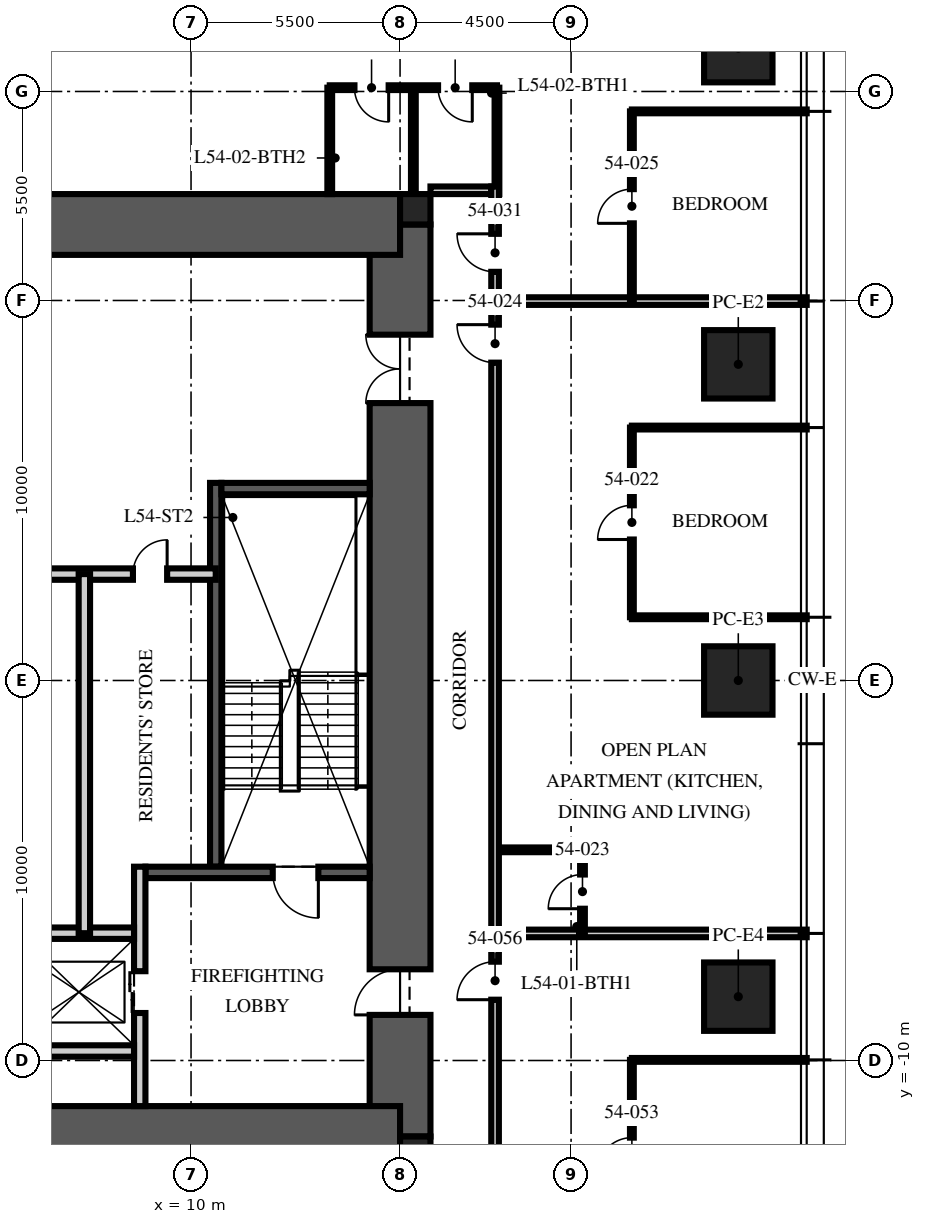
"""IFC4 building model, lengths in metres.
Left out: names, types, materials, properties, quantities, classifications, styles, units other than length and angle.
Written with IfcOpenShell. Run it as: python <this file> out.ifc"""

import sys

from ifc_helpers import new_model, si_unit, direction, frame, frame_2d, origin, origin_2d, place, context, subcontext, project, spatial, rectangle, extrude, element, fill, save


model = new_model("IFC4")
c1 = context("Model", 3, precision=1e-05, world=origin(), true_north=direction((0.0, 1.0)))
c2 = subcontext(c1, "Body", "Model", "MODEL_VIEW")
j1 = project(units=[si_unit("LENGTHUNIT", "METRE"), si_unit("PLANEANGLEUNIT", "RADIAN")], contexts=[c1])
p1 = place(None, origin())
s1 = spatial("IfcSite", under=j1, at=p1, CompositionType="ELEMENT")
p2 = place(p1, origin())
s2 = spatial("IfcBuilding", under=s1, at=p2, CompositionType="ELEMENT")
p3 = place(p2, frame((0.0, 0.0, 218.25)))
s3 = spatial("IfcBuildingStorey", under=s2, at=p3, CompositionType="ELEMENT", Elevation=218.25)
p4 = place(p3, frame((15.5, -12.0, -0.25), z_axis=(0.0, 0.0, 1.0), x_axis=(0.0, 1.0, 0.0)))
e1 = element("IfcWall", 1, at=p4, inside=s3, PredefinedType="SHEAR", context=c2, shape_type="SweptSolid", body=[
    extrude(rectangle(XDim=24.0, YDim=1.6, at=frame_2d((12.0, 0.0))), origin(), (0.0, 0.0, 1.0), 3.75),
])
p5 = place(p4, frame((3.2, 0.0, 0.25)))
e2 = element("IfcOpeningElement", 2, at=p5, cuts=e1, PredefinedType="OPENING", context=c2, shape_type="SweptSolid", body=[
    extrude(rectangle(XDim=1.2, YDim=2.1, at=frame_2d((0.6, 1.05))), frame((0.0, 0.81, 0.0), z_axis=(0.0, -1.0, 0.0), x_axis=(1.0, 0.0, 0.0)), (0.0, 0.0, 1.0), 1.62),
])
p6 = place(p4, frame((19.3, 0.0, 0.25)))
e3 = element("IfcOpeningElement", 3, at=p6, cuts=e1, PredefinedType="OPENING", context=c2, shape_type="SweptSolid", body=[
    extrude(rectangle(XDim=1.8, YDim=2.1, at=frame_2d((0.9, 1.05))), frame((0.0, 0.81, 0.0), z_axis=(0.0, -1.0, 0.0), x_axis=(1.0, 0.0, 0.0)), (0.0, 0.0, 1.0), 1.62),
])
for number, where, z_axis, x_axis in (
    (4, (-15.5, 12.0, -0.25), (0.0, 0.0, 1.0), (1.0, 0.0, 0.0)),
    (5, (-15.5, -12.0, -0.25), (0.0, 0.0, 1.0), (1.0, 0.0, 0.0)),
):
    element("IfcWall", number, at=place(p3, frame(where, z_axis=z_axis, x_axis=x_axis)), inside=s3, PredefinedType="SHEAR", context=c2, shape_type="SweptSolid", body=[
        extrude(rectangle(XDim=31.0, YDim=1.6, at=frame_2d((15.5, 0.0))), origin(), (0.0, 0.0, 1.0), 3.75),
    ])
for number, where, z_axis, x_axis in (
    (6, (15.9, 12.4, -0.25), (0.0, 0.0, 1.0), (1.0, 0.0, 0.0)),
    (7, (15.9, -12.4, -0.25), (0.0, 0.0, 1.0), (1.0, 0.0, 0.0)),
):
    element("IfcColumn", number, at=place(p3, frame(where, z_axis=z_axis, x_axis=x_axis)), inside=s3, PredefinedType="COLUMN", context=c2, shape_type="SweptSolid", body=[
        extrude(rectangle(XDim=0.8, YDim=0.8, at=origin_2d()), origin(), (0.0, 0.0, 1.0), 3.75),
    ])
for number, where, z_axis, x_axis in (
    (8, (24.4, 16.64, 0.0), (0.0, 0.0, 1.0), (0.0, 1.0, 0.0)),
    (9, (24.4, 8.32, 0.0), (0.0, 0.0, 1.0), (0.0, 1.0, 0.0)),
    (10, (24.4, 0.0, 0.0), (0.0, 0.0, 1.0), (0.0, 1.0, 0.0)),
    (11, (24.4, -8.32, 0.0), (0.0, 0.0, 1.0), (0.0, 1.0, 0.0)),
):
    element("IfcColumn", number, at=place(p3, frame(where, z_axis=z_axis, x_axis=x_axis)), inside=s3, PredefinedType="COLUMN", context=c2, shape_type="SweptSolid", body=[
        extrude(rectangle(XDim=1.8, YDim=1.8, at=origin_2d()), origin(), (0.0, 0.0, 1.0), 3.75),
    ])
p7 = place(p3, frame((10.65, -4.9, 0.0), z_axis=(0.0, 0.0, 1.0), x_axis=(0.0, 1.0, 0.0)))
e12 = element("IfcWall", 12, at=p7, inside=s3, PredefinedType="SOLIDWALL", context=c2, shape_type="SweptSolid", body=[
    extrude(rectangle(XDim=10.1, YDim=0.3, at=frame_2d((5.05, 0.0))), origin(), (0.0, 0.0, 1.0), 3.5),
])
p8 = place(p3, frame((14.7, -5.05, 0.0), z_axis=(0.0, 0.0, 1.0), x_axis=(-1.0, 0.0, 0.0)))
e13 = element("IfcWall", 13, at=p8, inside=s3, PredefinedType="SOLIDWALL", context=c2, shape_type="SweptSolid", body=[
    extrude(rectangle(XDim=5.9, YDim=0.3, at=frame_2d((2.95, 0.0))), origin(), (0.0, 0.0, 1.0), 3.5),
])
p9 = place(p8, frame((1.35, 0.0, 0.0)))
e14 = element("IfcOpeningElement", 14, at=p9, cuts=e13, PredefinedType="OPENING", context=c2, shape_type="SweptSolid", body=[
    extrude(rectangle(XDim=1.2, YDim=2.1, at=frame_2d((0.6, 1.05))), frame((0.0, 0.16, 0.0), z_axis=(0.0, -1.0, 0.0), x_axis=(1.0, 0.0, 0.0)), (0.0, 0.0, 1.0), 0.32),
])
p10 = place(p3, frame((14.7, 5.05, 0.0), z_axis=(0.0, 0.0, 1.0), x_axis=(-1.0, 0.0, 0.0)))
e15 = element("IfcWall", 15, at=p10, inside=s3, PredefinedType="SOLIDWALL", context=c2, shape_type="SweptSolid", body=[
    extrude(rectangle(XDim=3.9, YDim=0.3, at=frame_2d((1.95, 0.0))), origin(), (0.0, 0.0, 1.0), 3.5),
])
p11 = place(p3, frame((8.65, -11.2, 0.0), z_axis=(0.0, 0.0, 1.0), x_axis=(0.0, 1.0, 0.0)))
e16 = element("IfcWall", 16, at=p11, inside=s3, PredefinedType="PARTITIONING", context=c2, shape_type="SweptSolid", body=[
    extrude(rectangle(XDim=6.3, YDim=0.3, at=frame_2d((3.15, 0.0))), origin(), (0.0, 0.0, 1.0), 3.5),
])
p12 = place(p11, frame((2.45, 0.0, 0.0)))
e17 = element("IfcOpeningElement", 17, at=p12, cuts=e16, PredefinedType="OPENING", context=c2, shape_type="SweptSolid", body=[
    extrude(rectangle(XDim=1.1, YDim=2.1, at=frame_2d((0.55, 1.05))), frame((0.0, 0.16, 0.0), z_axis=(0.0, -1.0, 0.0), x_axis=(1.0, 0.0, 0.0)), (0.0, 0.0, 1.0), 0.32),
])
p13 = place(p3, frame((-8.5, -6.65, 0.0), z_axis=(0.0, 0.0, 1.0), x_axis=(1.0, 0.0, 0.0)))
e18 = element("IfcWall", 18, at=p13, inside=s3, PredefinedType="PARTITIONING", context=c2, shape_type="SweptSolid", body=[
    extrude(rectangle(XDim=17.0, YDim=0.3, at=frame_2d((8.5, 0.0))), origin(), (0.0, 0.0, 1.0), 3.5),
])
p14 = place(p13, frame((7.8, 0.0, 0.0)))
e19 = element("IfcOpeningElement", 19, at=p14, cuts=e18, PredefinedType="OPENING", context=c2, shape_type="SweptSolid", body=[
    extrude(rectangle(XDim=1.3, YDim=2.4, at=frame_2d((0.65, 1.2))), frame((0.0, 0.16, 0.0), z_axis=(0.0, -1.0, 0.0), x_axis=(1.0, 0.0, 0.0)), (0.0, 0.0, 1.0), 0.32),
])
p15 = place(p13, frame((5.65, 0.0, 0.0)))
e20 = element("IfcOpeningElement", 20, at=p15, cuts=e18, PredefinedType="OPENING", context=c2, shape_type="SweptSolid", body=[
    extrude(rectangle(XDim=0.9, YDim=2.1, at=frame_2d((0.45, 1.05))), frame((0.0, 0.16, 0.0), z_axis=(0.0, -1.0, 0.0), x_axis=(1.0, 0.0, 0.0)), (0.0, 0.0, 1.0), 0.32),
])
p16 = place(p13, frame((10.4, 0.0, 0.0)))
e21 = element("IfcOpeningElement", 21, at=p16, cuts=e18, PredefinedType="OPENING", context=c2, shape_type="SweptSolid", body=[
    extrude(rectangle(XDim=0.9, YDim=2.1, at=frame_2d((0.45, 1.05))), frame((0.0, 0.16, 0.0), z_axis=(0.0, -1.0, 0.0), x_axis=(1.0, 0.0, 0.0)), (0.0, 0.0, 1.0), 0.32),
])
p17 = place(p3, frame((5.6, -9.75, 0.0), z_axis=(0.0, 0.0, 1.0), x_axis=(1.0, 0.0, 0.0)))
e22 = element("IfcWall", 22, at=p17, inside=s3, PredefinedType="PARTITIONING", context=c2, shape_type="SweptSolid", body=[
    extrude(rectangle(XDim=2.9, YDim=0.3, at=frame_2d((1.45, 0.0))), origin(), (0.0, 0.0, 1.0), 3.5),
])
p18 = place(p3, frame((-10.65, 2.8, 0.0), z_axis=(0.0, 0.0, 1.0), x_axis=(1.0, 0.0, 0.0)))
e23 = element("IfcWall", 23, at=p18, inside=s3, PredefinedType="PARTITIONING", context=c2, shape_type="SweptSolid", body=[
    extrude(rectangle(XDim=21.3, YDim=0.3, at=frame_2d((10.65, 0.0))), origin(), (0.0, 0.0, 1.0), 3.5),
])
p19 = place(p18, frame((10.05, 0.0, 0.0)))
e24 = element("IfcOpeningElement", 24, at=p19, cuts=e23, PredefinedType="OPENING", context=c2, shape_type="SweptSolid", body=[
    extrude(rectangle(XDim=1.2, YDim=2.1, at=frame_2d((0.6, 1.05))), frame((0.0, 0.16, 0.0), z_axis=(0.0, -1.0, 0.0), x_axis=(1.0, 0.0, 0.0)), (0.0, 0.0, 1.0), 0.32),
])
p20 = place(p18, frame((19.121, 0.0, 0.0)))
e25 = element("IfcOpeningElement", 25, at=p20, cuts=e23, PredefinedType="OPENING", context=c2, shape_type="SweptSolid", body=[
    extrude(rectangle(XDim=0.9, YDim=2.1, at=frame_2d((0.45, 1.05))), frame((0.0, 0.16, 0.0), z_axis=(0.0, -1.0, 0.0), x_axis=(1.0, 0.0, 0.0)), (0.0, 0.0, 1.0), 0.32),
])
p21 = place(p3, frame((7.193, -6.65, 0.0), z_axis=(0.0, 0.0, 1.0), x_axis=(0.0, 1.0, 0.0)))
e26 = element("IfcWall", 26, at=p21, inside=s3, PredefinedType="PARTITIONING", context=c2, shape_type="SweptSolid", body=[
    extrude(rectangle(XDim=9.45, YDim=0.3, at=frame_2d((4.725, 0.0))), origin(), (0.0, 0.0, 1.0), 3.5),
])
p22 = place(p3, frame((16.3, 12.9, 0.0), z_axis=(0.0, 0.0, 1.0), x_axis=(1.0, 0.0, 0.0)))
e27 = element("IfcWall", 27, at=p22, inside=s3, PredefinedType="PARTITIONING", context=c2, shape_type="SweptSolid", body=[
    extrude(rectangle(XDim=1.6, YDim=0.2, at=frame_2d((0.8, 0.0))), origin(), (0.0, 0.0, 1.0), 2.3),
])
p23 = place(p3, frame((18.1, -6.656, 0.0), z_axis=(0.0, 0.0, 1.0), x_axis=(1.0, 0.0, 0.0)))
e28 = element("IfcWall", 28, at=p23, inside=s3, PredefinedType="PARTITIONING", context=c2, shape_type="SweptSolid", body=[
    extrude(rectangle(XDim=8.1, YDim=0.2, at=frame_2d((4.05, 0.0))), origin(), (0.0, 0.0, 1.0), 2.91),
])
for number, where, z_axis, x_axis in (
    (29, (21.6, 1.664, 0.0), (0.0, 0.0, 1.0), (1.0, 0.0, 0.0)),
    (30, (21.6, 6.656, 0.0), (0.0, 0.0, 1.0), (1.0, 0.0, 0.0)),
):
    element("IfcWall", number, at=place(p3, frame(where, z_axis=z_axis, x_axis=x_axis)), inside=s3, PredefinedType="PARTITIONING", context=c2, shape_type="SweptSolid", body=[
        extrude(rectangle(XDim=4.6, YDim=0.1, at=frame_2d((2.3, 0.0))), origin(), (0.0, 0.0, 1.0), 2.91),
    ])
p24 = place(p3, frame((18.1, 9.984, 0.0), z_axis=(0.0, 0.0, 1.0), x_axis=(1.0, 0.0, 0.0)))
e31 = element("IfcWall", 31, at=p24, inside=s3, PredefinedType="PARTITIONING", context=c2, shape_type="SweptSolid", body=[
    extrude(rectangle(XDim=8.1, YDim=0.2, at=frame_2d((4.05, 0.0))), origin(), (0.0, 0.0, 1.0), 2.91),
])
for number, where, z_axis, x_axis in (
    (32, (21.6, 14.976, 0.0), (0.0, 0.0, 1.0), (1.0, 0.0, 0.0)),
    (33, (21.6, -9.984, 0.0), (0.0, 0.0, 1.0), (1.0, 0.0, 0.0)),
):
    element("IfcWall", number, at=place(p3, frame(where, z_axis=z_axis, x_axis=x_axis)), inside=s3, PredefinedType="PARTITIONING", context=c2, shape_type="SweptSolid", body=[
        extrude(rectangle(XDim=4.6, YDim=0.1, at=frame_2d((2.3, 0.0))), origin(), (0.0, 0.0, 1.0), 2.91),
    ])
p25 = place(p3, frame((21.6, 1.664, 0.0), z_axis=(0.0, 0.0, 1.0), x_axis=(0.0, 1.0, 0.0)))
e34 = element("IfcWall", 34, at=p25, inside=s3, PredefinedType="PARTITIONING", context=c2, shape_type="SweptSolid", body=[
    extrude(rectangle(XDim=4.992, YDim=0.1, at=frame_2d((2.496, 0.0))), origin(), (0.0, 0.0, 1.0), 2.81),
])
p26 = place(p25, frame((2.046, 0.0, 0.0)))
e35 = element("IfcOpeningElement", 35, at=p26, cuts=e34, PredefinedType="OPENING", context=c2, shape_type="SweptSolid", body=[
    extrude(rectangle(XDim=0.9, YDim=2.1, at=frame_2d((0.45, 1.05))), frame((0.0, 0.06, 0.0), z_axis=(0.0, -1.0, 0.0), x_axis=(1.0, 0.0, 0.0)), (0.0, 0.0, 1.0), 0.12),
])
p27 = place(p3, frame((20.3, -6.656, 0.0), z_axis=(0.0, 0.0, 1.0), x_axis=(0.0, 1.0, 0.0)))
e36 = element("IfcWall", 36, at=p27, inside=s3, PredefinedType="PARTITIONING", context=c2, shape_type="SweptSolid", body=[
    extrude(rectangle(XDim=2.2, YDim=0.125, at=frame_2d((1.1, 0.0))), origin(), (0.0, 0.0, 1.0), 3.5),
])
p28 = place(p27, frame((0.65, 0.0, 0.0)))
e37 = element("IfcOpeningElement", 37, at=p28, cuts=e36, PredefinedType="OPENING", context=c2, shape_type="SweptSolid", body=[
    extrude(rectangle(XDim=0.9, YDim=2.1, at=frame_2d((0.45, 1.05))), frame((0.0, 0.073, 0.0), z_axis=(0.0, -1.0, 0.0), x_axis=(1.0, 0.0, 0.0)), (0.0, 0.0, 1.0), 0.145),
])
p29 = place(p3, frame((18.1, -4.456, 0.0), z_axis=(0.0, 0.0, 1.0), x_axis=(1.0, 0.0, 0.0)))
e38 = element("IfcWall", 38, at=p29, inside=s3, PredefinedType="PARTITIONING", context=c2, shape_type="SweptSolid", body=[
    extrude(rectangle(XDim=2.2, YDim=0.125, at=frame_2d((1.1, 0.0))), origin(), (0.0, 0.0, 1.0), 3.5),
])
p30 = place(p3, frame((21.6, 9.984, 0.0), z_axis=(0.0, 0.0, 1.0), x_axis=(0.0, 1.0, 0.0)))
e39 = element("IfcWall", 39, at=p30, inside=s3, PredefinedType="PARTITIONING", context=c2, shape_type="SweptSolid", body=[
    extrude(rectangle(XDim=4.992, YDim=0.1, at=frame_2d((2.496, 0.0))), origin(), (0.0, 0.0, 1.0), 2.81),
])
p31 = place(p30, frame((2.046, 0.0, 0.0)))
e40 = element("IfcOpeningElement", 40, at=p31, cuts=e39, PredefinedType="OPENING", context=c2, shape_type="SweptSolid", body=[
    extrude(rectangle(XDim=0.9, YDim=2.1, at=frame_2d((0.45, 1.05))), frame((0.0, 0.06, 0.0), z_axis=(0.0, -1.0, 0.0), x_axis=(1.0, 0.0, 0.0)), (0.0, 0.0, 1.0), 0.12),
])
p32 = place(p3, frame((18.05, 15.6, 0.0), z_axis=(0.0, 0.0, 1.0), x_axis=(-1.0, 0.0, 0.0)))
e41 = element("IfcWall", 41, at=p32, inside=s3, PredefinedType="PARTITIONING", context=c2, shape_type="SweptSolid", body=[
    extrude(rectangle(XDim=4.4, YDim=0.125, at=frame_2d((2.2, 0.0))), origin(), (0.0, 0.0, 1.0), 2.3),
])
p33 = place(p32, frame((0.65, 0.0, 0.0)))
e42 = element("IfcOpeningElement", 42, at=p33, cuts=e41, PredefinedType="OPENING", context=c2, shape_type="SweptSolid", body=[
    extrude(rectangle(XDim=0.9, YDim=2.1, at=frame_2d((0.45, 1.05))), frame((0.0, 0.073, 0.0), z_axis=(0.0, -1.0, 0.0), x_axis=(1.0, 0.0, 0.0)), (0.0, 0.0, 1.0), 0.145),
])
p34 = place(p32, frame((2.85, 0.0, 0.0)))
e43 = element("IfcOpeningElement", 43, at=p34, cuts=e41, PredefinedType="OPENING", context=c2, shape_type="SweptSolid", body=[
    extrude(rectangle(XDim=0.9, YDim=2.1, at=frame_2d((0.45, 1.05))), frame((0.0, 0.073, 0.0), z_axis=(0.0, -1.0, 0.0), x_axis=(1.0, 0.0, 0.0)), (0.0, 0.0, 1.0), 0.145),
])
for number, where, z_axis, x_axis in (
    (44, (18.05, 12.8, 0.0), (0.0, 0.0, 1.0), (0.0, 1.0, 0.0)),
    (45, (15.85, 12.8, 0.0), (0.0, 0.0, 1.0), (0.0, 1.0, 0.0)),
):
    element("IfcWall", number, at=place(p3, frame(where, z_axis=z_axis, x_axis=x_axis)), inside=s3, PredefinedType="PARTITIONING", context=c2, shape_type="SweptSolid", body=[
        extrude(rectangle(XDim=2.8, YDim=0.125, at=frame_2d((1.4, 0.0))), origin(), (0.0, 0.0, 1.0), 2.3),
    ])
p35 = place(p3, frame((13.65, 12.8, 0.0), z_axis=(0.0, 0.0, 1.0), x_axis=(0.0, 1.0, 0.0)))
e46 = element("IfcWall", 46, at=p35, inside=s3, PredefinedType="PARTITIONING", context=c2, shape_type="SweptSolid", body=[
    extrude(rectangle(XDim=2.8, YDim=0.125, at=frame_2d((1.4, 0.0))), origin(), (0.0, 0.0, 1.0), 3.5),
])
p36 = place(p3, frame((21.6, -14.976, 0.0), z_axis=(0.0, 0.0, 1.0), x_axis=(0.0, 1.0, 0.0)))
e47 = element("IfcWall", 47, at=p36, inside=s3, PredefinedType="PARTITIONING", context=c2, shape_type="SweptSolid", body=[
    extrude(rectangle(XDim=4.992, YDim=0.1, at=frame_2d((2.496, 0.0))), origin(), (0.0, 0.0, 1.0), 2.81),
])
p37 = place(p36, frame((2.046, 0.0, 0.0)))
e48 = element("IfcOpeningElement", 48, at=p37, cuts=e47, PredefinedType="OPENING", context=c2, shape_type="SweptSolid", body=[
    extrude(rectangle(XDim=0.9, YDim=2.1, at=frame_2d((0.45, 1.05))), frame((0.0, 0.06, 0.0), z_axis=(0.0, -1.0, 0.0), x_axis=(1.0, 0.0, 0.0)), (0.0, 0.0, 1.0), 0.12),
])
p38 = place(p3, frame((18.0, -13.0, 0.0), z_axis=(0.0, 0.0, 1.0), x_axis=(0.0, 1.0, 0.0)))
e49 = element("IfcWall", 49, at=p38, inside=s3, PredefinedType="PARTITIONING", context=c2, shape_type="SweptSolid", body=[
    extrude(rectangle(XDim=26.0, YDim=0.2, at=frame_2d((13.0, 0.0))), origin(), (0.0, 0.0, 1.0), 2.6),
])
p39 = place(p38, frame((21.364, 0.0, 0.0)))
e50 = element("IfcOpeningElement", 50, at=p39, cuts=e49, PredefinedType="OPENING", context=c2, shape_type="SweptSolid", body=[
    extrude(rectangle(XDim=1.0, YDim=2.2, at=frame_2d((0.5, 1.1))), frame((0.0, 0.11, 0.0), z_axis=(0.0, -1.0, 0.0), x_axis=(1.0, 0.0, 0.0)), (0.0, 0.0, 1.0), 0.22),
])
p40 = place(p38, frame((23.754, 0.0, 0.0)))
e51 = element("IfcOpeningElement", 51, at=p40, cuts=e49, PredefinedType="OPENING", context=c2, shape_type="SweptSolid", body=[
    extrude(rectangle(XDim=1.0, YDim=2.2, at=frame_2d((0.5, 1.1))), frame((0.0, 0.11, 0.0), z_axis=(0.0, -1.0, 0.0), x_axis=(1.0, 0.0, 0.0)), (0.0, 0.0, 1.0), 0.22),
])
p41 = place(p38, frame((4.6, 0.0, 0.0)))
e52 = element("IfcOpeningElement", 52, at=p41, cuts=e49, PredefinedType="OPENING", context=c2, shape_type="SweptSolid", body=[
    extrude(rectangle(XDim=1.0, YDim=2.2, at=frame_2d((0.5, 1.1))), frame((0.0, 0.11, 0.0), z_axis=(0.0, -1.0, 0.0), x_axis=(1.0, 0.0, 0.0)), (0.0, 0.0, 1.0), 0.22),
])
p42 = place(p9, origin())
e53 = element("IfcDoor", 53, at=p42, inside=s3, OperationType="SINGLE_SWING_LEFT", PredefinedType="DOOR", context=c2, shape_type="SweptSolid", body=[
    extrude(rectangle(XDim=1.2, YDim=2.1, at=frame_2d((0.6, 1.05))), frame((0.0, 0.025, 0.0), z_axis=(0.0, -1.0, 0.0), x_axis=(1.0, 0.0, 0.0)), (0.0, 0.0, 1.0), 0.05),
])
fill(e14, e53)
p43 = place(p5, origin())
e54 = element("IfcDoor", 54, at=p43, inside=s3, OperationType="SINGLE_SWING_LEFT", PredefinedType="DOOR", context=c2, shape_type="SweptSolid", body=[
    extrude(rectangle(XDim=1.2, YDim=2.1, at=frame_2d((0.6, 1.05))), frame((0.0, 0.025, 0.0), z_axis=(0.0, -1.0, 0.0), x_axis=(1.0, 0.0, 0.0)), (0.0, 0.0, 1.0), 0.05),
])
fill(e2, e54)
p44 = place(p6, origin())
e55 = element("IfcDoor", 55, at=p44, inside=s3, OperationType="DOUBLE_DOOR_SINGLE_SWING", PredefinedType="DOOR", context=c2, shape_type="SweptSolid", body=[
    extrude(rectangle(XDim=1.8, YDim=2.1, at=frame_2d((0.9, 1.05))), frame((0.0, 0.025, 0.0), z_axis=(0.0, -1.0, 0.0), x_axis=(1.0, 0.0, 0.0)), (0.0, 0.0, 1.0), 0.05),
])
fill(e3, e55)
p45 = place(p12, origin())
e56 = element("IfcDoor", 56, at=p45, inside=s3, OperationType="DOUBLE_DOOR_SLIDING", PredefinedType="DOOR", context=c2, shape_type="SweptSolid", body=[
    extrude(rectangle(XDim=1.1, YDim=2.1, at=frame_2d((0.55, 1.05))), frame((0.0, 0.025, 0.0), z_axis=(0.0, -1.0, 0.0), x_axis=(1.0, 0.0, 0.0)), (0.0, 0.0, 1.0), 0.05),
])
fill(e17, e56)
p46 = place(p20, origin())
e57 = element("IfcDoor", 57, at=p46, inside=s3, OperationType="SINGLE_SWING_RIGHT", PredefinedType="DOOR", context=c2, shape_type="SweptSolid", body=[
    extrude(rectangle(XDim=0.9, YDim=2.1, at=frame_2d((0.45, 1.05))), frame((0.0, 0.025, 0.0), z_axis=(0.0, -1.0, 0.0), x_axis=(1.0, 0.0, 0.0)), (0.0, 0.0, 1.0), 0.05),
])
fill(e25, e57)
p47 = place(p26, origin())
e58 = element("IfcDoor", 58, at=p47, inside=s3, OperationType="SINGLE_SWING_LEFT", PredefinedType="DOOR", context=c2, shape_type="SweptSolid", body=[
    extrude(rectangle(XDim=0.9, YDim=2.1, at=frame_2d((0.45, 1.05))), frame((0.0, 0.025, 0.0), z_axis=(0.0, -1.0, 0.0), x_axis=(1.0, 0.0, 0.0)), (0.0, 0.0, 1.0), 0.05),
])
fill(e35, e58)
p48 = place(p28, origin())
e59 = element("IfcDoor", 59, at=p48, inside=s3, OperationType="SINGLE_SWING_LEFT", PredefinedType="DOOR", context=c2, shape_type="SweptSolid", body=[
    extrude(rectangle(XDim=0.9, YDim=2.1, at=frame_2d((0.45, 1.05))), frame((0.0, 0.025, 0.0), z_axis=(0.0, -1.0, 0.0), x_axis=(1.0, 0.0, 0.0)), (0.0, 0.0, 1.0), 0.05),
])
fill(e37, e59)
p49 = place(p39, origin())
e60 = element("IfcDoor", 60, at=p49, inside=s3, OperationType="SINGLE_SWING_RIGHT", PredefinedType="DOOR", context=c2, shape_type="SweptSolid", body=[
    extrude(rectangle(XDim=1.0, YDim=2.2, at=frame_2d((0.5, 1.1))), frame((0.0, 0.025, 0.0), z_axis=(0.0, -1.0, 0.0), x_axis=(1.0, 0.0, 0.0)), (0.0, 0.0, 1.0), 0.05),
])
fill(e50, e60)
p50 = place(p31, origin())
e61 = element("IfcDoor", 61, at=p50, inside=s3, OperationType="SINGLE_SWING_LEFT", PredefinedType="DOOR", context=c2, shape_type="SweptSolid", body=[
    extrude(rectangle(XDim=0.9, YDim=2.1, at=frame_2d((0.45, 1.05))), frame((0.0, 0.025, 0.0), z_axis=(0.0, -1.0, 0.0), x_axis=(1.0, 0.0, 0.0)), (0.0, 0.0, 1.0), 0.05),
])
fill(e40, e61)
p51 = place(p33, origin())
e62 = element("IfcDoor", 62, at=p51, inside=s3, OperationType="SINGLE_SWING_LEFT", PredefinedType="DOOR", context=c2, shape_type="SweptSolid", body=[
    extrude(rectangle(XDim=0.9, YDim=2.1, at=frame_2d((0.45, 1.05))), frame((0.0, 0.025, 0.0), z_axis=(0.0, -1.0, 0.0), x_axis=(1.0, 0.0, 0.0)), (0.0, 0.0, 1.0), 0.05),
])
fill(e42, e62)
p52 = place(p34, origin())
e63 = element("IfcDoor", 63, at=p52, inside=s3, OperationType="SINGLE_SWING_LEFT", PredefinedType="DOOR", context=c2, shape_type="SweptSolid", body=[
    extrude(rectangle(XDim=0.9, YDim=2.1, at=frame_2d((0.45, 1.05))), frame((0.0, 0.025, 0.0), z_axis=(0.0, -1.0, 0.0), x_axis=(1.0, 0.0, 0.0)), (0.0, 0.0, 1.0), 0.05),
])
fill(e43, e63)
p53 = place(p40, origin())
e64 = element("IfcDoor", 64, at=p53, inside=s3, OperationType="SINGLE_SWING_RIGHT", PredefinedType="DOOR", context=c2, shape_type="SweptSolid", body=[
    extrude(rectangle(XDim=1.0, YDim=2.2, at=frame_2d((0.5, 1.1))), frame((0.0, 0.025, 0.0), z_axis=(0.0, -1.0, 0.0), x_axis=(1.0, 0.0, 0.0)), (0.0, 0.0, 1.0), 0.05),
])
fill(e51, e64)
p54 = place(p37, origin())
e65 = element("IfcDoor", 65, at=p54, inside=s3, OperationType="SINGLE_SWING_LEFT", PredefinedType="DOOR", context=c2, shape_type="SweptSolid", body=[
    extrude(rectangle(XDim=0.9, YDim=2.1, at=frame_2d((0.45, 1.05))), frame((0.0, 0.025, 0.0), z_axis=(0.0, -1.0, 0.0), x_axis=(1.0, 0.0, 0.0)), (0.0, 0.0, 1.0), 0.05),
])
fill(e48, e65)
p55 = place(p41, origin())
e66 = element("IfcDoor", 66, at=p55, inside=s3, OperationType="SINGLE_SWING_LEFT", PredefinedType="DOOR", context=c2, shape_type="SweptSolid", body=[
    extrude(rectangle(XDim=1.0, YDim=2.2, at=frame_2d((0.5, 1.1))), frame((0.0, 0.025, 0.0), z_axis=(0.0, -1.0, 0.0), x_axis=(1.0, 0.0, 0.0)), (0.0, 0.0, 1.0), 0.05),
])
fill(e52, e66)
save(model, sys.argv[1])
